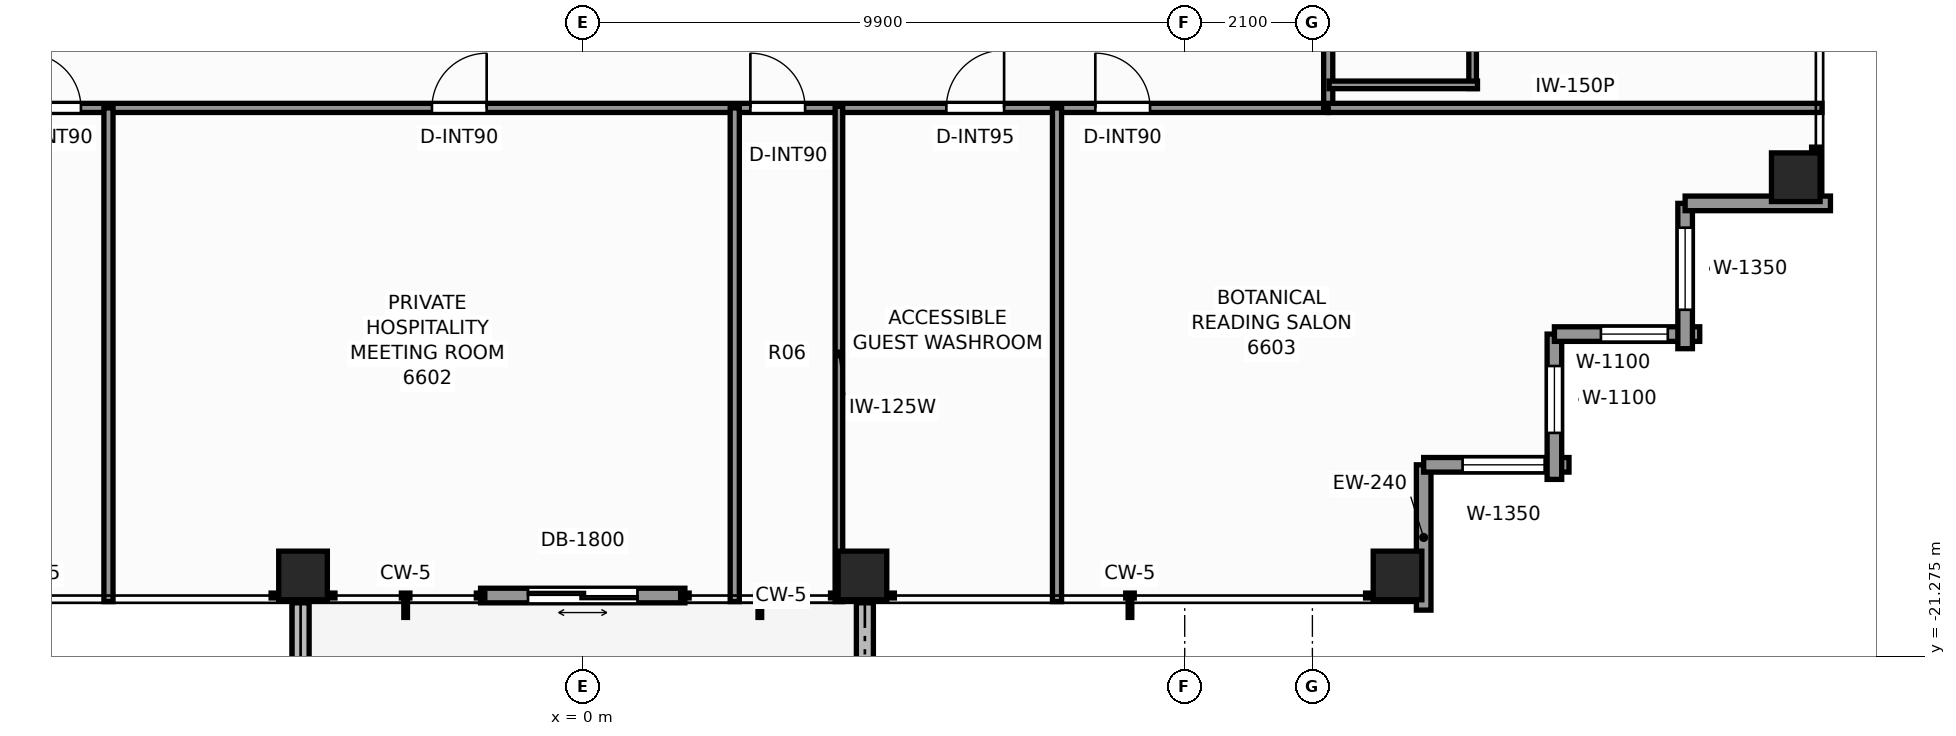
"""IFC4 building model, lengths in metres.
Left out: names, types, materials, properties, quantities, classifications, styles, units other than length and angle.
Written with IfcOpenShell. Run it as: python <this file> out.ifc"""

import sys

from ifc_helpers import new_model, si_unit, direction, frame, frame_2d, origin, origin_2d, place, context, subcontext, project, spatial, rectangle, extrude, element, fill, save


model = new_model("IFC4")
c1 = context("Model", 3, precision=1e-05, world=origin(), true_north=direction((0.0, 1.0)))
c2 = subcontext(c1, "Body", "Model", "MODEL_VIEW")
j1 = project(units=[si_unit("LENGTHUNIT", "METRE"), si_unit("PLANEANGLEUNIT", "RADIAN")], contexts=[c1])
p1 = place(None, origin())
s1 = spatial("IfcSite", under=j1, at=p1, CompositionType="ELEMENT")
p2 = place(p1, origin())
s2 = spatial("IfcBuilding", under=s1, at=p2, CompositionType="ELEMENT")
p3 = place(p2, frame((0.0, 0.0, 226.2)))
s3 = spatial("IfcBuildingStorey", under=s2, at=p3, CompositionType="ELEMENT", Elevation=226.2)
for number, where, z_axis, x_axis in (
    (1, (-4.6, -19.95, 0.0), (0.0, 0.0, 1.0), (1.0, 0.0, 0.0)),
    (2, (4.6, -19.95, 0.0), (0.0, 0.0, 1.0), (1.0, 0.0, 0.0)),
    (3, (13.4, -19.95, 0.0), (0.0, 0.0, 1.0), (1.0, 0.0, 0.0)),
    (4, (19.95, -13.4, 0.0), (0.0, 0.0, 1.0), (1.0, 0.0, 0.0)),
):
    element("IfcColumn", number, at=place(p3, frame(where, z_axis=z_axis, x_axis=x_axis)), inside=s3, PredefinedType="COLUMN", context=c2, shape_type="SweptSolid", body=[
        extrude(rectangle(XDim=0.8, YDim=0.8, at=origin_2d()), origin(), (0.0, 0.0, 1.0), 3.3),
    ])
for number, where, z_axis, x_axis in (
    (5, (4.64, -23.7, -0.04), (0.0, 0.0, 1.0), (0.0, 1.0, 0.0)),
    (6, (-4.64, -20.4, -0.04), (0.0, 0.0, 1.0), (0.0, -1.0, 0.0)),
):
    element("IfcWall", number, at=place(p3, frame(where, z_axis=z_axis, x_axis=x_axis)), inside=s3, PredefinedType="PARAPET", context=c2, shape_type="SweptSolid", body=[
        extrude(rectangle(XDim=3.3, YDim=0.28, at=frame_2d((1.65, 0.0))), origin(), (0.0, 0.0, 1.0), 0.42),
    ])
p4 = place(p3, frame((1.68, -20.28, 0.0), z_axis=(0.0, 0.0, 1.0), x_axis=(-1.0, 0.0, 0.0)))
e7 = element("IfcWall", 7, at=p4, inside=s3, PredefinedType="STANDARD", context=c2, shape_type="SweptSolid", body=[
    extrude(rectangle(XDim=3.36, YDim=0.24, at=frame_2d((1.68, 0.0))), origin(), (0.0, 0.0, 1.0), 3.08),
])
p5 = place(p4, frame((0.78, 0.0, 0.0)))
e8 = element("IfcOpeningElement", 8, at=p5, cuts=e7, PredefinedType="OPENING", context=c2, shape_type="SweptSolid", body=[
    extrude(rectangle(XDim=1.8, YDim=2.2, at=frame_2d((0.9, 1.1))), frame((0.0, 0.13, 0.0), z_axis=(0.0, -1.0, 0.0), x_axis=(1.0, 0.0, 0.0)), (0.0, 0.0, 1.0), 0.26),
])
p6 = place(p3, frame((13.83, -18.13, 0.0), z_axis=(0.0, 0.0, 1.0), x_axis=(0.0, -1.0, 0.0)))
e9 = element("IfcWall", 9, at=p6, inside=s3, PredefinedType="STANDARD", context=c2, shape_type="SweptSolid", body=[
    extrude(rectangle(XDim=2.39, YDim=0.24, at=frame_2d((1.195, 0.0))), origin(), (0.0, 0.0, 1.0), 2.463),
])
p7 = place(p3, frame((16.22, -18.13, 0.0), z_axis=(0.0, 0.0, 1.0), x_axis=(-1.0, 0.0, 0.0)))
e10 = element("IfcWall", 10, at=p7, inside=s3, PredefinedType="STANDARD", context=c2, shape_type="SweptSolid", body=[
    extrude(rectangle(XDim=2.39, YDim=0.24, at=frame_2d((1.195, 0.0))), origin(), (0.0, 0.0, 1.0), 2.463),
])
p8 = place(p7, frame((0.4, 0.0, 0.65)))
e11 = element("IfcOpeningElement", 11, at=p8, cuts=e10, PredefinedType="OPENING", context=c2, shape_type="SweptSolid", body=[
    extrude(rectangle(XDim=1.35, YDim=1.55, at=frame_2d((0.675, 0.775))), frame((0.0, 0.13, 0.0), z_axis=(0.0, -1.0, 0.0), x_axis=(1.0, 0.0, 0.0)), (0.0, 0.0, 1.0), 0.26),
])
p9 = place(p3, frame((15.98, -15.98, 0.0), z_axis=(0.0, 0.0, 1.0), x_axis=(0.0, -1.0, 0.0)))
e12 = element("IfcWall", 12, at=p9, inside=s3, PredefinedType="STANDARD", context=c2, shape_type="SweptSolid", body=[
    extrude(rectangle(XDim=2.39, YDim=0.24, at=frame_2d((1.195, 0.0))), origin(), (0.0, 0.0, 1.0), 2.463),
])
p10 = place(p9, frame((0.525, 0.0, 0.65)))
e13 = element("IfcOpeningElement", 13, at=p10, cuts=e12, PredefinedType="OPENING", context=c2, shape_type="SweptSolid", body=[
    extrude(rectangle(XDim=1.1, YDim=1.45, at=frame_2d((0.55, 0.725))), frame((0.0, 0.13, 0.0), z_axis=(0.0, -1.0, 0.0), x_axis=(1.0, 0.0, 0.0)), (0.0, 0.0, 1.0), 0.26),
])
p11 = place(p3, frame((18.37, -15.98, 0.0), z_axis=(0.0, 0.0, 1.0), x_axis=(-1.0, 0.0, 0.0)))
e14 = element("IfcWall", 14, at=p11, inside=s3, PredefinedType="STANDARD", context=c2, shape_type="SweptSolid", body=[
    extrude(rectangle(XDim=2.39, YDim=0.24, at=frame_2d((1.195, 0.0))), origin(), (0.0, 0.0, 1.0), 2.463),
])
p12 = place(p11, frame((0.525, 0.0, 0.65)))
e15 = element("IfcOpeningElement", 15, at=p12, cuts=e14, PredefinedType="OPENING", context=c2, shape_type="SweptSolid", body=[
    extrude(rectangle(XDim=1.1, YDim=1.45, at=frame_2d((0.55, 0.725))), frame((0.0, 0.13, 0.0), z_axis=(0.0, -1.0, 0.0), x_axis=(1.0, 0.0, 0.0)), (0.0, 0.0, 1.0), 0.26),
])
p13 = place(p3, frame((18.13, -13.83, 0.0), z_axis=(0.0, 0.0, 1.0), x_axis=(0.0, -1.0, 0.0)))
e16 = element("IfcWall", 16, at=p13, inside=s3, PredefinedType="STANDARD", context=c2, shape_type="SweptSolid", body=[
    extrude(rectangle(XDim=2.39, YDim=0.24, at=frame_2d((1.195, 0.0))), origin(), (0.0, 0.0, 1.0), 2.463),
])
p14 = place(p13, frame((0.4, 0.0, 0.65)))
e17 = element("IfcOpeningElement", 17, at=p14, cuts=e16, PredefinedType="OPENING", context=c2, shape_type="SweptSolid", body=[
    extrude(rectangle(XDim=1.35, YDim=1.55, at=frame_2d((0.675, 0.775))), frame((0.0, 0.13, 0.0), z_axis=(0.0, -1.0, 0.0), x_axis=(1.0, 0.0, 0.0)), (0.0, 0.0, 1.0), 0.26),
])
p15 = place(p3, frame((20.52, -13.83, 0.0), z_axis=(0.0, 0.0, 1.0), x_axis=(-1.0, 0.0, 0.0)))
e18 = element("IfcWall", 18, at=p15, inside=s3, PredefinedType="STANDARD", context=c2, shape_type="SweptSolid", body=[
    extrude(rectangle(XDim=2.39, YDim=0.24, at=frame_2d((1.195, 0.0))), origin(), (0.0, 0.0, 1.0), 2.463),
])
p16 = place(p3, frame((-12.42, -12.26, 0.0), z_axis=(0.0, 0.0, 1.0), x_axis=(1.0, 0.0, 0.0)))
e19 = element("IfcWall", 19, at=p16, inside=s3, PredefinedType="PARTITIONING", context=c2, shape_type="SweptSolid", body=[
    extrude(rectangle(XDim=24.68, YDim=0.15, at=frame_2d((12.34, 0.0))), origin(), (0.0, 0.0, 1.0), 2.369),
])
p17 = place(p16, frame((3.267, 0.0, 0.0)))
e20 = element("IfcOpeningElement", 20, at=p17, cuts=e19, PredefinedType="OPENING", context=c2, shape_type="SweptSolid", body=[
    extrude(rectangle(XDim=0.9, YDim=2.06, at=frame_2d((0.45, 1.03))), frame((0.0, 0.085, 0.0), z_axis=(0.0, -1.0, 0.0), x_axis=(1.0, 0.0, 0.0)), (0.0, 0.0, 1.0), 0.17),
])
p18 = place(p16, frame((9.94, 0.0, 0.0)))
e21 = element("IfcOpeningElement", 21, at=p18, cuts=e19, PredefinedType="OPENING", context=c2, shape_type="SweptSolid", body=[
    extrude(rectangle(XDim=0.9, YDim=2.06, at=frame_2d((0.45, 1.03))), frame((0.0, 0.085, 0.0), z_axis=(0.0, -1.0, 0.0), x_axis=(1.0, 0.0, 0.0)), (0.0, 0.0, 1.0), 0.17),
])
p19 = place(p16, frame((15.177, 0.0, 0.0)))
e22 = element("IfcOpeningElement", 22, at=p19, cuts=e19, PredefinedType="OPENING", context=c2, shape_type="SweptSolid", body=[
    extrude(rectangle(XDim=0.9, YDim=2.06, at=frame_2d((0.45, 1.03))), frame((0.0, 0.085, 0.0), z_axis=(0.0, -1.0, 0.0), x_axis=(1.0, 0.0, 0.0)), (0.0, 0.0, 1.0), 0.17),
])
p20 = place(p16, frame((18.4, 0.0, 0.0)))
e23 = element("IfcOpeningElement", 23, at=p20, cuts=e19, PredefinedType="OPENING", context=c2, shape_type="SweptSolid", body=[
    extrude(rectangle(XDim=0.95, YDim=2.06, at=frame_2d((0.475, 1.03))), frame((0.0, 0.085, 0.0), z_axis=(0.0, -1.0, 0.0), x_axis=(1.0, 0.0, 0.0)), (0.0, 0.0, 1.0), 0.17),
])
p21 = place(p16, frame((20.85, 0.0, 0.0)))
e24 = element("IfcOpeningElement", 24, at=p21, cuts=e19, PredefinedType="OPENING", context=c2, shape_type="SweptSolid", body=[
    extrude(rectangle(XDim=0.9, YDim=2.06, at=frame_2d((0.45, 1.03))), frame((0.0, 0.085, 0.0), z_axis=(0.0, -1.0, 0.0), x_axis=(1.0, 0.0, 0.0)), (0.0, 0.0, 1.0), 0.17),
])
p22 = place(p3, frame((12.26, -12.26, 0.0), z_axis=(0.0, 0.0, 1.0), x_axis=(0.0, 1.0, 0.0)))
e25 = element("IfcWall", 25, at=p22, inside=s3, PredefinedType="PARTITIONING", context=c2, shape_type="SweptSolid", body=[
    extrude(rectangle(XDim=24.84, YDim=0.15, at=frame_2d((12.42, 0.0))), origin(), (0.0, 0.0, 1.0), 2.369),
])
p23 = place(p22, frame((3.581, 0.0, 0.0)))
e26 = element("IfcOpeningElement", 26, at=p23, cuts=e25, PredefinedType="OPENING", context=c2, shape_type="SweptSolid", body=[
    extrude(rectangle(XDim=0.95, YDim=2.06, at=frame_2d((0.475, 1.03))), frame((0.0, 0.085, 0.0), z_axis=(0.0, -1.0, 0.0), x_axis=(1.0, 0.0, 0.0)), (0.0, 0.0, 1.0), 0.17),
])
p24 = place(p22, frame((9.755, 0.0, 0.0)))
e27 = element("IfcOpeningElement", 27, at=p24, cuts=e25, PredefinedType="OPENING", context=c2, shape_type="SweptSolid", body=[
    extrude(rectangle(XDim=0.95, YDim=2.06, at=frame_2d((0.475, 1.03))), frame((0.0, 0.085, 0.0), z_axis=(0.0, -1.0, 0.0), x_axis=(1.0, 0.0, 0.0)), (0.0, 0.0, 1.0), 0.17),
])
p25 = place(p22, frame((19.32, 0.0, 0.0)))
e28 = element("IfcOpeningElement", 28, at=p25, cuts=e25, PredefinedType="OPENING", context=c2, shape_type="SweptSolid", body=[
    extrude(rectangle(XDim=0.95, YDim=2.06, at=frame_2d((0.475, 1.03))), frame((0.0, 0.085, 0.0), z_axis=(0.0, -1.0, 0.0), x_axis=(1.0, 0.0, 0.0)), (0.0, 0.0, 1.0), 0.17),
])
p26 = place(p3, frame((12.26, -12.26, 0.0), z_axis=(0.0, 0.0, 1.0), x_axis=(1.0, 0.0, 0.0)))
e29 = element("IfcWall", 29, at=p26, inside=s3, PredefinedType="PARTITIONING", context=c2, shape_type="SweptSolid", body=[
    extrude(rectangle(XDim=8.12, YDim=0.15, at=frame_2d((4.06, 0.0))), origin(), (0.0, 0.0, 1.0), 2.369),
])
for number, where, z_axis, x_axis in (
    (30, (-7.8, -20.38, 0.0), (0.0, 0.0, 1.0), (0.0, 1.0, 0.0)),
    (31, (2.5, -20.38, 0.0), (0.0, 0.0, 1.0), (0.0, 1.0, 0.0)),
    (32, (7.8, -20.38, 0.0), (0.0, 0.0, 1.0), (0.0, 1.0, 0.0)),
):
    element("IfcWall", number, at=place(p3, frame(where, z_axis=z_axis, x_axis=x_axis)), inside=s3, PredefinedType="PARTITIONING", context=c2, shape_type="SweptSolid", body=[
        extrude(rectangle(XDim=8.12, YDim=0.15, at=frame_2d((4.06, 0.0))), origin(), (0.0, 0.0, 1.0), 2.453),
    ])
p27 = place(p3, frame((4.213, -20.38, 0.0), z_axis=(0.0, 0.0, 1.0), x_axis=(0.0, 1.0, 0.0)))
e33 = element("IfcWall", 33, at=p27, inside=s3, PredefinedType="PARTITIONING", context=c2, shape_type="SweptSolid", body=[
    extrude(rectangle(XDim=8.145, YDim=0.125, at=frame_2d((4.072, 0.0))), origin(), (0.0, 0.0, 1.0), 2.453),
])
p28 = place(p3, frame((14.635, -11.941, 0.0), z_axis=(0.0, 0.0, 1.0), x_axis=(0.0, 1.0, 0.0)))
e34 = element("IfcWall", 34, at=p28, inside=s3, PredefinedType="PARTITIONING", context=c2, shape_type="SweptSolid", body=[
    extrude(rectangle(XDim=2.27, YDim=0.125, at=frame_2d((1.135, 0.0))), origin(), (0.0, 0.0, 1.0), 2.369),
])
p29 = place(p3, frame((12.275, -11.881, 0.0), z_axis=(0.0, 0.0, 1.0), x_axis=(1.0, 0.0, 0.0)))
e35 = element("IfcWall", 35, at=p29, inside=s3, PredefinedType="PARTITIONING", context=c2, shape_type="SweptSolid", body=[
    extrude(rectangle(XDim=2.44, YDim=0.125, at=frame_2d((1.22, 0.0))), origin(), (0.0, 0.0, 1.0), 3.08),
])
p30 = place(p5, origin())
e36 = element("IfcDoor", 36, at=p30, inside=s3, OperationType="DOUBLE_DOOR_SLIDING", PredefinedType="DOOR", context=c2, shape_type="SweptSolid", body=[
    extrude(rectangle(XDim=1.8, YDim=2.2, at=frame_2d((0.9, 1.1))), frame((0.0, 0.025, 0.0), z_axis=(0.0, -1.0, 0.0), x_axis=(1.0, 0.0, 0.0)), (0.0, 0.0, 1.0), 0.05),
])
fill(e8, e36)
p31 = place(p8, origin())
e37 = element("IfcWindow", 37, at=p31, inside=s3, PartitioningType="SINGLE_PANEL", PredefinedType="WINDOW", context=c2, shape_type="SweptSolid", body=[
    extrude(rectangle(XDim=1.35, YDim=1.55, at=frame_2d((0.675, 0.775))), frame((0.0, 0.03, 0.0), z_axis=(0.0, -1.0, 0.0), x_axis=(1.0, 0.0, 0.0)), (0.0, 0.0, 1.0), 0.06),
])
fill(e11, e37)
p32 = place(p10, origin())
e38 = element("IfcWindow", 38, at=p32, inside=s3, PartitioningType="SINGLE_PANEL", PredefinedType="WINDOW", context=c2, shape_type="SweptSolid", body=[
    extrude(rectangle(XDim=1.1, YDim=1.45, at=frame_2d((0.55, 0.725))), frame((0.0, 0.03, 0.0), z_axis=(0.0, -1.0, 0.0), x_axis=(1.0, 0.0, 0.0)), (0.0, 0.0, 1.0), 0.06),
])
fill(e13, e38)
p33 = place(p12, origin())
e39 = element("IfcWindow", 39, at=p33, inside=s3, PartitioningType="SINGLE_PANEL", PredefinedType="WINDOW", context=c2, shape_type="SweptSolid", body=[
    extrude(rectangle(XDim=1.1, YDim=1.45, at=frame_2d((0.55, 0.725))), frame((0.0, 0.03, 0.0), z_axis=(0.0, -1.0, 0.0), x_axis=(1.0, 0.0, 0.0)), (0.0, 0.0, 1.0), 0.06),
])
fill(e15, e39)
p34 = place(p14, origin())
e40 = element("IfcWindow", 40, at=p34, inside=s3, PartitioningType="SINGLE_PANEL", PredefinedType="WINDOW", context=c2, shape_type="SweptSolid", body=[
    extrude(rectangle(XDim=1.35, YDim=1.55, at=frame_2d((0.675, 0.775))), frame((0.0, 0.03, 0.0), z_axis=(0.0, -1.0, 0.0), x_axis=(1.0, 0.0, 0.0)), (0.0, 0.0, 1.0), 0.06),
])
fill(e17, e40)
p35 = place(p17, origin())
e41 = element("IfcDoor", 41, at=p35, inside=s3, OperationType="SINGLE_SWING_LEFT", PredefinedType="DOOR", context=c2, shape_type="SweptSolid", body=[
    extrude(rectangle(XDim=0.9, YDim=2.06, at=frame_2d((0.45, 1.03))), frame((0.0, 0.025, 0.0), z_axis=(0.0, -1.0, 0.0), x_axis=(1.0, 0.0, 0.0)), (0.0, 0.0, 1.0), 0.05),
])
fill(e20, e41)
p36 = place(p18, origin())
e42 = element("IfcDoor", 42, at=p36, inside=s3, OperationType="SINGLE_SWING_RIGHT", PredefinedType="DOOR", context=c2, shape_type="SweptSolid", body=[
    extrude(rectangle(XDim=0.9, YDim=2.06, at=frame_2d((0.45, 1.03))), frame((0.0, 0.025, 0.0), z_axis=(0.0, -1.0, 0.0), x_axis=(1.0, 0.0, 0.0)), (0.0, 0.0, 1.0), 0.05),
])
fill(e21, e42)
p37 = place(p19, origin())
e43 = element("IfcDoor", 43, at=p37, inside=s3, OperationType="SINGLE_SWING_LEFT", PredefinedType="DOOR", context=c2, shape_type="SweptSolid", body=[
    extrude(rectangle(XDim=0.9, YDim=2.06, at=frame_2d((0.45, 1.03))), frame((0.0, 0.025, 0.0), z_axis=(0.0, -1.0, 0.0), x_axis=(1.0, 0.0, 0.0)), (0.0, 0.0, 1.0), 0.05),
])
fill(e22, e43)
p38 = place(p20, origin())
e44 = element("IfcDoor", 44, at=p38, inside=s3, OperationType="SINGLE_SWING_RIGHT", PredefinedType="DOOR", context=c2, shape_type="SweptSolid", body=[
    extrude(rectangle(XDim=0.95, YDim=2.06, at=frame_2d((0.475, 1.03))), frame((0.0, 0.025, 0.0), z_axis=(0.0, -1.0, 0.0), x_axis=(1.0, 0.0, 0.0)), (0.0, 0.0, 1.0), 0.05),
])
fill(e23, e44)
p39 = place(p21, origin())
e45 = element("IfcDoor", 45, at=p39, inside=s3, OperationType="SINGLE_SWING_LEFT", PredefinedType="DOOR", context=c2, shape_type="SweptSolid", body=[
    extrude(rectangle(XDim=0.9, YDim=2.06, at=frame_2d((0.45, 1.03))), frame((0.0, 0.025, 0.0), z_axis=(0.0, -1.0, 0.0), x_axis=(1.0, 0.0, 0.0)), (0.0, 0.0, 1.0), 0.05),
])
fill(e24, e45)
save(model, sys.argv[1])
